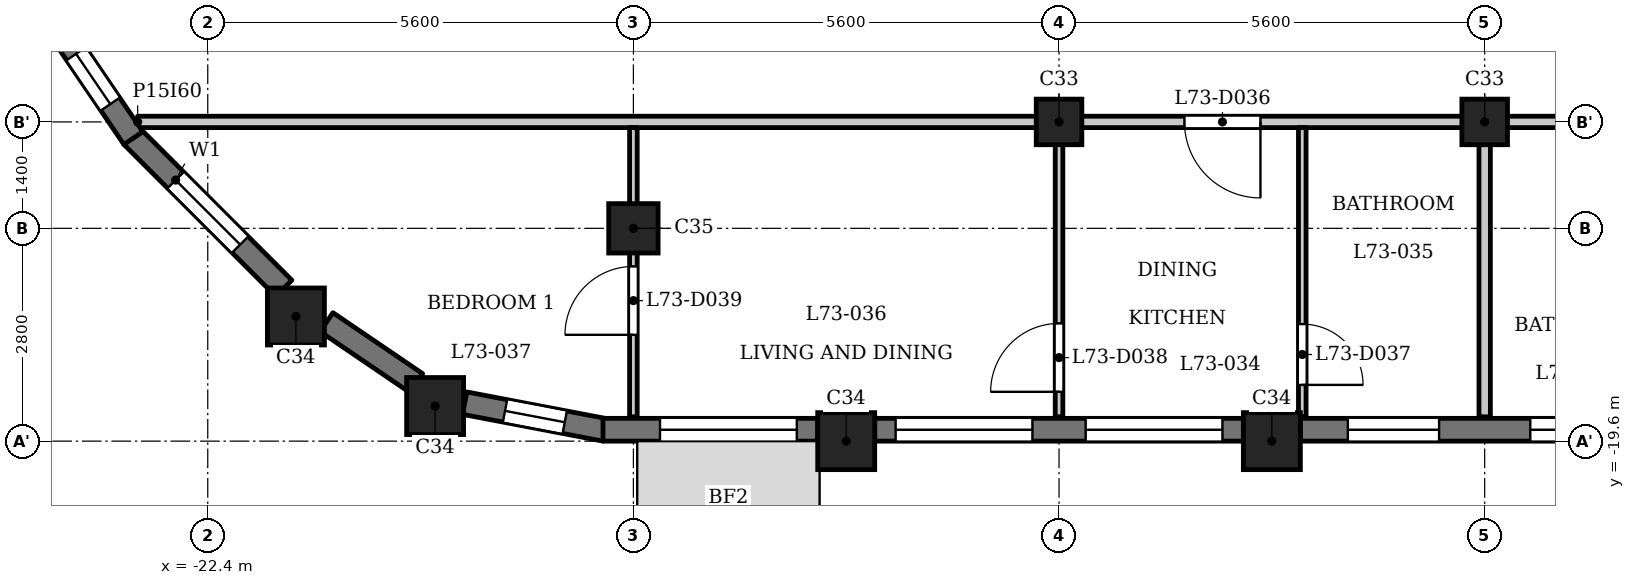
"""IFC4 building model, lengths in metres.
Left out: names, types, materials, properties, quantities, classifications, styles, units other than length and angle.
Written with IfcOpenShell. Run it as: python <this file> out.ifc"""

import sys

from ifc_helpers import new_model, si_unit, direction, frame, frame_2d, origin, origin_2d, place, context, subcontext, project, spatial, rectangle, extrude, element, fill, save


model = new_model("IFC4")
c1 = context("Model", 3, precision=1e-05, world=origin(), true_north=direction((0.0, 1.0)))
c2 = subcontext(c1, "Body", "Model", "MODEL_VIEW")
j1 = project(units=[si_unit("LENGTHUNIT", "METRE"), si_unit("PLANEANGLEUNIT", "RADIAN")], contexts=[c1])
p1 = place(None, origin())
s1 = spatial("IfcSite", under=j1, at=p1, CompositionType="ELEMENT")
p2 = place(p1, origin())
s2 = spatial("IfcBuilding", under=s1, at=p2, CompositionType="ELEMENT")
p3 = place(p2, frame((0.0, 0.0, 280.2)))
s3 = spatial("IfcBuildingStorey", under=s2, at=p3, CompositionType="ELEMENT", Elevation=280.2)
for number, where, z_axis, x_axis in (
    (1, (-19.409, -19.138, 0.0), (0.0, 0.0, 1.0), (1.0, 0.0, 0.0)),
    (2, (-14.0, -19.6, 0.0), (0.0, 0.0, 1.0), (1.0, 0.0, 0.0)),
    (3, (-8.4, -19.6, 0.0), (0.0, 0.0, 1.0), (1.0, 0.0, 0.0)),
    (4, (-21.24, -17.96, 0.0), (0.0, 0.0, 1.0), (1.0, 0.0, 0.0)),
):
    element("IfcColumn", number, at=place(p3, frame(where, z_axis=z_axis, x_axis=x_axis)), inside=s3, PredefinedType="COLUMN", context=c2, shape_type="SweptSolid", body=[
        extrude(rectangle(XDim=0.75, YDim=0.75, at=origin_2d()), origin(), (0.0, 0.0, 1.0), 3.5),
    ])
p4 = place(p3, frame((-16.8, -16.8, 0.0), z_axis=(0.0, 0.0, 1.0), x_axis=(1.0, 0.0, 0.0)))
e5 = element("IfcColumn", 5, at=p4, inside=s3, PredefinedType="COLUMN", context=c2, shape_type="SweptSolid", body=[
    extrude(rectangle(XDim=0.65, YDim=0.65, at=origin_2d()), origin(), (0.0, 0.0, 1.0), 3.5),
])
for number, where, z_axis, x_axis in (
    (6, (-11.2, -15.4, 0.0), (0.0, 0.0, 1.0), (1.0, 0.0, 0.0)),
    (7, (-5.6, -15.4, 0.0), (0.0, 0.0, 1.0), (1.0, 0.0, 0.0)),
):
    element("IfcColumn", number, at=place(p3, frame(where, z_axis=z_axis, x_axis=x_axis)), inside=s3, PredefinedType="COLUMN", context=c2, shape_type="SweptSolid", body=[
        extrude(rectangle(XDim=0.6, YDim=0.6, at=origin_2d()), origin(), (0.0, 0.0, 1.0), 3.5),
    ])
p5 = place(p3, frame((-23.397, -15.591, 0.0), z_axis=(0.0, 0.0, 1.0), x_axis=(0.707106781187, -0.707106781187, 0.0)))
e8 = element("IfcWall", 8, at=p5, inside=s3, PredefinedType="SOLIDWALL", context=c2, shape_type="SweptSolid", body=[
    extrude(rectangle(XDim=2.825, YDim=0.3, at=frame_2d((1.413, 0.0))), origin(), (0.0, 0.0, 1.0), 2.5),
])
p6 = place(p5, frame((0.812, 0.0, 0.6)))
e9 = element("IfcOpeningElement", 9, at=p6, cuts=e8, PredefinedType="OPENING", context=c2, shape_type="SweptSolid", body=[
    extrude(rectangle(XDim=1.2, YDim=1.55, at=frame_2d((0.6, 0.775))), frame((0.0, 0.16, 0.0), z_axis=(0.0, -1.0, 0.0), x_axis=(1.0, 0.0, 0.0)), (0.0, 0.0, 1.0), 0.32),
])
p7 = place(p3, frame((-20.837, -18.034, 0.0), z_axis=(0.0, 0.0, 1.0), x_axis=(0.827095130818, -0.562061957952, 0.0)))
e10 = element("IfcWall", 10, at=p7, inside=s3, PredefinedType="SOLIDWALL", context=c2, shape_type="SweptSolid", body=[
    extrude(rectangle(XDim=1.427, YDim=0.3, at=frame_2d((0.713, 0.0))), origin(), (0.0, 0.0, 1.0), 2.5),
])
p8 = place(p3, frame((-19.02, -19.1, 0.0), z_axis=(0.0, 0.0, 1.0), x_axis=(0.982284001233, -0.187398348234, 0.0)))
e11 = element("IfcWall", 11, at=p8, inside=s3, PredefinedType="SOLIDWALL", context=c2, shape_type="SweptSolid", body=[
    extrude(rectangle(XDim=1.881, YDim=0.3, at=frame_2d((0.941, 0.0))), origin(), (0.0, 0.0, 1.0), 2.5),
])
p9 = place(p8, frame((0.541, 0.0, 0.6)))
e12 = element("IfcOpeningElement", 12, at=p9, cuts=e11, PredefinedType="OPENING", context=c2, shape_type="SweptSolid", body=[
    extrude(rectangle(XDim=0.8, YDim=1.55, at=frame_2d((0.4, 0.775))), frame((0.0, 0.16, 0.0), z_axis=(0.0, -1.0, 0.0), x_axis=(1.0, 0.0, 0.0)), (0.0, 0.0, 1.0), 0.32),
])
p10 = place(p3, frame((-17.2, -19.45, 0.0), z_axis=(0.0, 0.0, 1.0), x_axis=(1.0, 0.0, 0.0)))
e13 = element("IfcWall", 13, at=p10, inside=s3, PredefinedType="SOLIDWALL", context=c2, shape_type="SweptSolid", body=[
    extrude(rectangle(XDim=2.825, YDim=0.3, at=frame_2d((1.413, 0.0))), origin(), (0.0, 0.0, 1.0), 2.5),
])
p11 = place(p10, frame((0.75, 0.0, 0.9)))
e14 = element("IfcOpeningElement", 14, at=p11, cuts=e13, PredefinedType="OPENING", context=c2, shape_type="SweptSolid", body=[
    extrude(rectangle(XDim=1.8, YDim=1.25, at=frame_2d((0.9, 0.625))), frame((0.0, 0.16, 0.0), z_axis=(0.0, -1.0, 0.0), x_axis=(1.0, 0.0, 0.0)), (0.0, 0.0, 1.0), 0.32),
])
p12 = place(p3, frame((-13.625, -19.45, 0.0), z_axis=(0.0, 0.0, 1.0), x_axis=(1.0, 0.0, 0.0)))
e15 = element("IfcWall", 15, at=p12, inside=s3, PredefinedType="SOLIDWALL", context=c2, shape_type="SweptSolid", body=[
    extrude(rectangle(XDim=4.85, YDim=0.3, at=frame_2d((2.425, 0.0))), origin(), (0.0, 0.0, 1.0), 2.5),
])
p13 = place(p12, frame((0.275, 0.0, 0.9)))
e16 = element("IfcOpeningElement", 16, at=p13, cuts=e15, PredefinedType="OPENING", context=c2, shape_type="SweptSolid", body=[
    extrude(rectangle(XDim=1.8, YDim=1.25, at=frame_2d((0.9, 0.625))), frame((0.0, 0.16, 0.0), z_axis=(0.0, -1.0, 0.0), x_axis=(1.0, 0.0, 0.0)), (0.0, 0.0, 1.0), 0.32),
])
p14 = place(p12, frame((2.775, 0.0, 0.9)))
e17 = element("IfcOpeningElement", 17, at=p14, cuts=e15, PredefinedType="OPENING", context=c2, shape_type="SweptSolid", body=[
    extrude(rectangle(XDim=1.8, YDim=1.25, at=frame_2d((0.9, 0.625))), frame((0.0, 0.16, 0.0), z_axis=(0.0, -1.0, 0.0), x_axis=(1.0, 0.0, 0.0)), (0.0, 0.0, 1.0), 0.32),
])
p15 = place(p3, frame((-8.025, -19.45, 0.0), z_axis=(0.0, 0.0, 1.0), x_axis=(1.0, 0.0, 0.0)))
e18 = element("IfcWall", 18, at=p15, inside=s3, PredefinedType="SOLIDWALL", context=c2, shape_type="SweptSolid", body=[
    extrude(rectangle(XDim=4.85, YDim=0.3, at=frame_2d((2.425, 0.0))), origin(), (0.0, 0.0, 1.0), 2.5),
])
p16 = place(p15, frame((0.625, 0.0, 0.6)))
e19 = element("IfcOpeningElement", 19, at=p16, cuts=e18, PredefinedType="OPENING", context=c2, shape_type="SweptSolid", body=[
    extrude(rectangle(XDim=1.2, YDim=1.55, at=frame_2d((0.6, 0.775))), frame((0.0, 0.16, 0.0), z_axis=(0.0, -1.0, 0.0), x_axis=(1.0, 0.0, 0.0)), (0.0, 0.0, 1.0), 0.32),
])
p17 = place(p15, frame((3.025, 0.0, 0.6)))
e20 = element("IfcOpeningElement", 20, at=p17, cuts=e18, PredefinedType="OPENING", context=c2, shape_type="SweptSolid", body=[
    extrude(rectangle(XDim=1.2, YDim=1.55, at=frame_2d((0.6, 0.775))), frame((0.0, 0.16, 0.0), z_axis=(0.0, -1.0, 0.0), x_axis=(1.0, 0.0, 0.0)), (0.0, 0.0, 1.0), 0.32),
])
p18 = place(p3, frame((-24.436, -14.057, 0.0), z_axis=(0.0, 0.0, 1.0), x_axis=(0.562075713892, -0.827085782645, 0.0)))
e21 = element("IfcWall", 21, at=p18, inside=s3, PredefinedType="SOLIDWALL", context=c2, shape_type="SweptSolid", body=[
    extrude(rectangle(XDim=1.881, YDim=0.3, at=frame_2d((0.94, 0.0))), origin(), (0.0, 0.0, 1.0), 2.5),
])
p19 = place(p18, frame((0.541, 0.0, 0.6)))
e22 = element("IfcOpeningElement", 22, at=p19, cuts=e21, PredefinedType="OPENING", context=c2, shape_type="SweptSolid", body=[
    extrude(rectangle(XDim=0.8, YDim=1.55, at=frame_2d((0.4, 0.775))), frame((0.0, 0.16, 0.0), z_axis=(0.0, -1.0, 0.0), x_axis=(1.0, 0.0, 0.0)), (0.0, 0.0, 1.0), 0.32),
])
p20 = place(p3, frame((-23.322, -15.4, 0.0), z_axis=(0.0, 0.0, 1.0), x_axis=(1.0, 0.0, 0.0)))
e23 = element("IfcWall", 23, at=p20, inside=s3, PredefinedType="PARTITIONING", context=c2, shape_type="SweptSolid", body=[
    extrude(rectangle(XDim=46.872, YDim=0.15, at=frame_2d((23.436, 0.0))), origin(), (0.0, 0.0, 1.0), 3.15),
])
p21 = place(p20, frame((13.772, 0.0, 0.0)))
e24 = element("IfcOpeningElement", 24, at=p21, cuts=e23, PredefinedType="OPENING", context=c2, shape_type="SweptSolid", body=[
    extrude(rectangle(XDim=1.0, YDim=2.1, at=frame_2d((0.5, 1.05))), frame((0.0, 0.085, 0.0), z_axis=(0.0, -1.0, 0.0), x_axis=(1.0, 0.0, 0.0)), (0.0, 0.0, 1.0), 0.17),
])
p22 = place(p20, frame((21.772, 0.0, 0.0)))
e25 = element("IfcOpeningElement", 25, at=p22, cuts=e23, PredefinedType="OPENING", context=c2, shape_type="SweptSolid", body=[
    extrude(rectangle(XDim=1.0, YDim=2.1, at=frame_2d((0.5, 1.05))), frame((0.0, 0.085, 0.0), z_axis=(0.0, -1.0, 0.0), x_axis=(1.0, 0.0, 0.0)), (0.0, 0.0, 1.0), 0.17),
])
p23 = place(p20, frame((31.972, 0.0, 0.0)))
e26 = element("IfcOpeningElement", 26, at=p23, cuts=e23, PredefinedType="OPENING", context=c2, shape_type="SweptSolid", body=[
    extrude(rectangle(XDim=1.0, YDim=2.1, at=frame_2d((0.5, 1.05))), frame((0.0, 0.085, 0.0), z_axis=(0.0, -1.0, 0.0), x_axis=(1.0, 0.0, 0.0)), (0.0, 0.0, 1.0), 0.17),
])
p24 = place(p3, frame((-16.8, -19.28, 0.0), z_axis=(0.0, 0.0, 1.0), x_axis=(0.0, 1.0, 0.0)))
e27 = element("IfcWall", 27, at=p24, inside=s3, PredefinedType="PARTITIONING", context=c2, shape_type="SweptSolid", body=[
    extrude(rectangle(XDim=3.805, YDim=0.1, at=frame_2d((1.902, 0.0))), origin(), (0.0, 0.0, 1.0), 3.15),
])
p25 = place(p24, frame((1.079, 0.0, 0.0)))
e28 = element("IfcOpeningElement", 28, at=p25, cuts=e27, PredefinedType="OPENING", context=c2, shape_type="SweptSolid", body=[
    extrude(rectangle(XDim=0.9, YDim=2.1, at=frame_2d((0.45, 1.05))), frame((0.0, 0.06, 0.0), z_axis=(0.0, -1.0, 0.0), x_axis=(1.0, 0.0, 0.0)), (0.0, 0.0, 1.0), 0.12),
])
p26 = place(p3, frame((-11.2, -19.28, 0.0), z_axis=(0.0, 0.0, 1.0), x_axis=(0.0, 1.0, 0.0)))
e29 = element("IfcWall", 29, at=p26, inside=s3, PredefinedType="PARTITIONING", context=c2, shape_type="SweptSolid", body=[
    extrude(rectangle(XDim=3.805, YDim=0.1, at=frame_2d((1.902, 0.0))), origin(), (0.0, 0.0, 1.0), 3.15),
])
p27 = place(p26, frame((0.329, 0.0, 0.0)))
e30 = element("IfcOpeningElement", 30, at=p27, cuts=e29, PredefinedType="OPENING", context=c2, shape_type="SweptSolid", body=[
    extrude(rectangle(XDim=0.9, YDim=2.1, at=frame_2d((0.45, 1.05))), frame((0.0, 0.06, 0.0), z_axis=(0.0, -1.0, 0.0), x_axis=(1.0, 0.0, 0.0)), (0.0, 0.0, 1.0), 0.12),
])
p28 = place(p3, frame((-8.0, -19.28, 0.0), z_axis=(0.0, 0.0, 1.0), x_axis=(0.0, 1.0, 0.0)))
e31 = element("IfcWall", 31, at=p28, inside=s3, PredefinedType="PARTITIONING", context=c2, shape_type="SweptSolid", body=[
    extrude(rectangle(XDim=3.805, YDim=0.1, at=frame_2d((1.902, 0.0))), origin(), (0.0, 0.0, 1.0), 3.15),
])
p29 = place(p28, frame((0.42, 0.0, 0.0)))
e32 = element("IfcOpeningElement", 32, at=p29, cuts=e31, PredefinedType="OPENING", context=c2, shape_type="SweptSolid", body=[
    extrude(rectangle(XDim=0.8, YDim=2.1, at=frame_2d((0.4, 1.05))), frame((0.0, 0.06, 0.0), z_axis=(0.0, -1.0, 0.0), x_axis=(1.0, 0.0, 0.0)), (0.0, 0.0, 1.0), 0.12),
])
p30 = place(p3, frame((-5.6, -19.28, 0.0), z_axis=(0.0, 0.0, 1.0), x_axis=(0.0, 1.0, 0.0)))
e33 = element("IfcWall", 33, at=p30, inside=s3, PredefinedType="PARTITIONING", context=c2, shape_type="SweptSolid", body=[
    extrude(rectangle(XDim=3.805, YDim=0.15, at=frame_2d((1.902, 0.0))), origin(), (0.0, 0.0, 1.0), 3.15),
])
p31 = place(p21, origin())
e34 = element("IfcDoor", 34, at=p31, inside=s3, OperationType="SINGLE_SWING_RIGHT", PredefinedType="DOOR", context=c2, shape_type="SweptSolid", body=[
    extrude(rectangle(XDim=1.0, YDim=2.1, at=frame_2d((0.5, 1.05))), frame((0.0, 0.025, 0.0), z_axis=(0.0, -1.0, 0.0), x_axis=(1.0, 0.0, 0.0)), (0.0, 0.0, 1.0), 0.05),
])
fill(e24, e34)
p32 = place(p29, origin())
e35 = element("IfcDoor", 35, at=p32, inside=s3, OperationType="SINGLE_SWING_LEFT", PredefinedType="DOOR", context=c2, shape_type="SweptSolid", body=[
    extrude(rectangle(XDim=0.8, YDim=2.1, at=frame_2d((0.4, 1.05))), frame((0.0, 0.025, 0.0), z_axis=(0.0, -1.0, 0.0), x_axis=(1.0, 0.0, 0.0)), (0.0, 0.0, 1.0), 0.05),
])
fill(e32, e35)
p33 = place(p27, origin())
e36 = element("IfcDoor", 36, at=p33, inside=s3, OperationType="SINGLE_SWING_RIGHT", PredefinedType="DOOR", context=c2, shape_type="SweptSolid", body=[
    extrude(rectangle(XDim=0.9, YDim=2.1, at=frame_2d((0.45, 1.05))), frame((0.0, 0.025, 0.0), z_axis=(0.0, -1.0, 0.0), x_axis=(1.0, 0.0, 0.0)), (0.0, 0.0, 1.0), 0.05),
])
fill(e30, e36)
p34 = place(p25, origin())
e37 = element("IfcDoor", 37, at=p34, inside=s3, OperationType="SINGLE_SWING_RIGHT", PredefinedType="DOOR", context=c2, shape_type="SweptSolid", body=[
    extrude(rectangle(XDim=0.9, YDim=2.1, at=frame_2d((0.45, 1.05))), frame((0.0, 0.025, 0.0), z_axis=(0.0, -1.0, 0.0), x_axis=(1.0, 0.0, 0.0)), (0.0, 0.0, 1.0), 0.05),
])
fill(e28, e37)
p35 = place(p6, origin())
e38 = element("IfcWindow", 38, at=p35, inside=s3, PartitioningType="SINGLE_PANEL", PredefinedType="WINDOW", context=c2, shape_type="SweptSolid", body=[
    extrude(rectangle(XDim=1.2, YDim=1.55, at=frame_2d((0.6, 0.775))), frame((0.0, 0.03, 0.0), z_axis=(0.0, -1.0, 0.0), x_axis=(1.0, 0.0, 0.0)), (0.0, 0.0, 1.0), 0.06),
])
fill(e9, e38)
p36 = place(p9, origin())
e39 = element("IfcWindow", 39, at=p36, inside=s3, PartitioningType="SINGLE_PANEL", PredefinedType="WINDOW", context=c2, shape_type="SweptSolid", body=[
    extrude(rectangle(XDim=0.8, YDim=1.55, at=frame_2d((0.4, 0.775))), frame((0.0, 0.03, 0.0), z_axis=(0.0, -1.0, 0.0), x_axis=(1.0, 0.0, 0.0)), (0.0, 0.0, 1.0), 0.06),
])
fill(e12, e39)
p37 = place(p11, origin())
e40 = element("IfcWindow", 40, at=p37, inside=s3, PartitioningType="SINGLE_PANEL", PredefinedType="WINDOW", context=c2, shape_type="SweptSolid", body=[
    extrude(rectangle(XDim=1.8, YDim=1.25, at=frame_2d((0.9, 0.625))), frame((0.0, 0.03, 0.0), z_axis=(0.0, -1.0, 0.0), x_axis=(1.0, 0.0, 0.0)), (0.0, 0.0, 1.0), 0.06),
])
fill(e14, e40)
p38 = place(p13, origin())
e41 = element("IfcWindow", 41, at=p38, inside=s3, PartitioningType="SINGLE_PANEL", PredefinedType="WINDOW", context=c2, shape_type="SweptSolid", body=[
    extrude(rectangle(XDim=1.8, YDim=1.25, at=frame_2d((0.9, 0.625))), frame((0.0, 0.03, 0.0), z_axis=(0.0, -1.0, 0.0), x_axis=(1.0, 0.0, 0.0)), (0.0, 0.0, 1.0), 0.06),
])
fill(e16, e41)
p39 = place(p14, origin())
e42 = element("IfcWindow", 42, at=p39, inside=s3, PartitioningType="SINGLE_PANEL", PredefinedType="WINDOW", context=c2, shape_type="SweptSolid", body=[
    extrude(rectangle(XDim=1.8, YDim=1.25, at=frame_2d((0.9, 0.625))), frame((0.0, 0.03, 0.0), z_axis=(0.0, -1.0, 0.0), x_axis=(1.0, 0.0, 0.0)), (0.0, 0.0, 1.0), 0.06),
])
fill(e17, e42)
p40 = place(p16, origin())
e43 = element("IfcWindow", 43, at=p40, inside=s3, PartitioningType="SINGLE_PANEL", PredefinedType="WINDOW", context=c2, shape_type="SweptSolid", body=[
    extrude(rectangle(XDim=1.2, YDim=1.55, at=frame_2d((0.6, 0.775))), frame((0.0, 0.03, 0.0), z_axis=(0.0, -1.0, 0.0), x_axis=(1.0, 0.0, 0.0)), (0.0, 0.0, 1.0), 0.06),
])
fill(e19, e43)
p41 = place(p17, origin())
e44 = element("IfcWindow", 44, at=p41, inside=s3, PartitioningType="SINGLE_PANEL", PredefinedType="WINDOW", context=c2, shape_type="SweptSolid", body=[
    extrude(rectangle(XDim=1.2, YDim=1.55, at=frame_2d((0.6, 0.775))), frame((0.0, 0.03, 0.0), z_axis=(0.0, -1.0, 0.0), x_axis=(1.0, 0.0, 0.0)), (0.0, 0.0, 1.0), 0.06),
])
fill(e20, e44)
p42 = place(p19, origin())
e45 = element("IfcWindow", 45, at=p42, inside=s3, PartitioningType="SINGLE_PANEL", PredefinedType="WINDOW", context=c2, shape_type="SweptSolid", body=[
    extrude(rectangle(XDim=0.8, YDim=1.55, at=frame_2d((0.4, 0.775))), frame((0.0, 0.03, 0.0), z_axis=(0.0, -1.0, 0.0), x_axis=(1.0, 0.0, 0.0)), (0.0, 0.0, 1.0), 0.06),
])
fill(e22, e45)
save(model, sys.argv[1])
